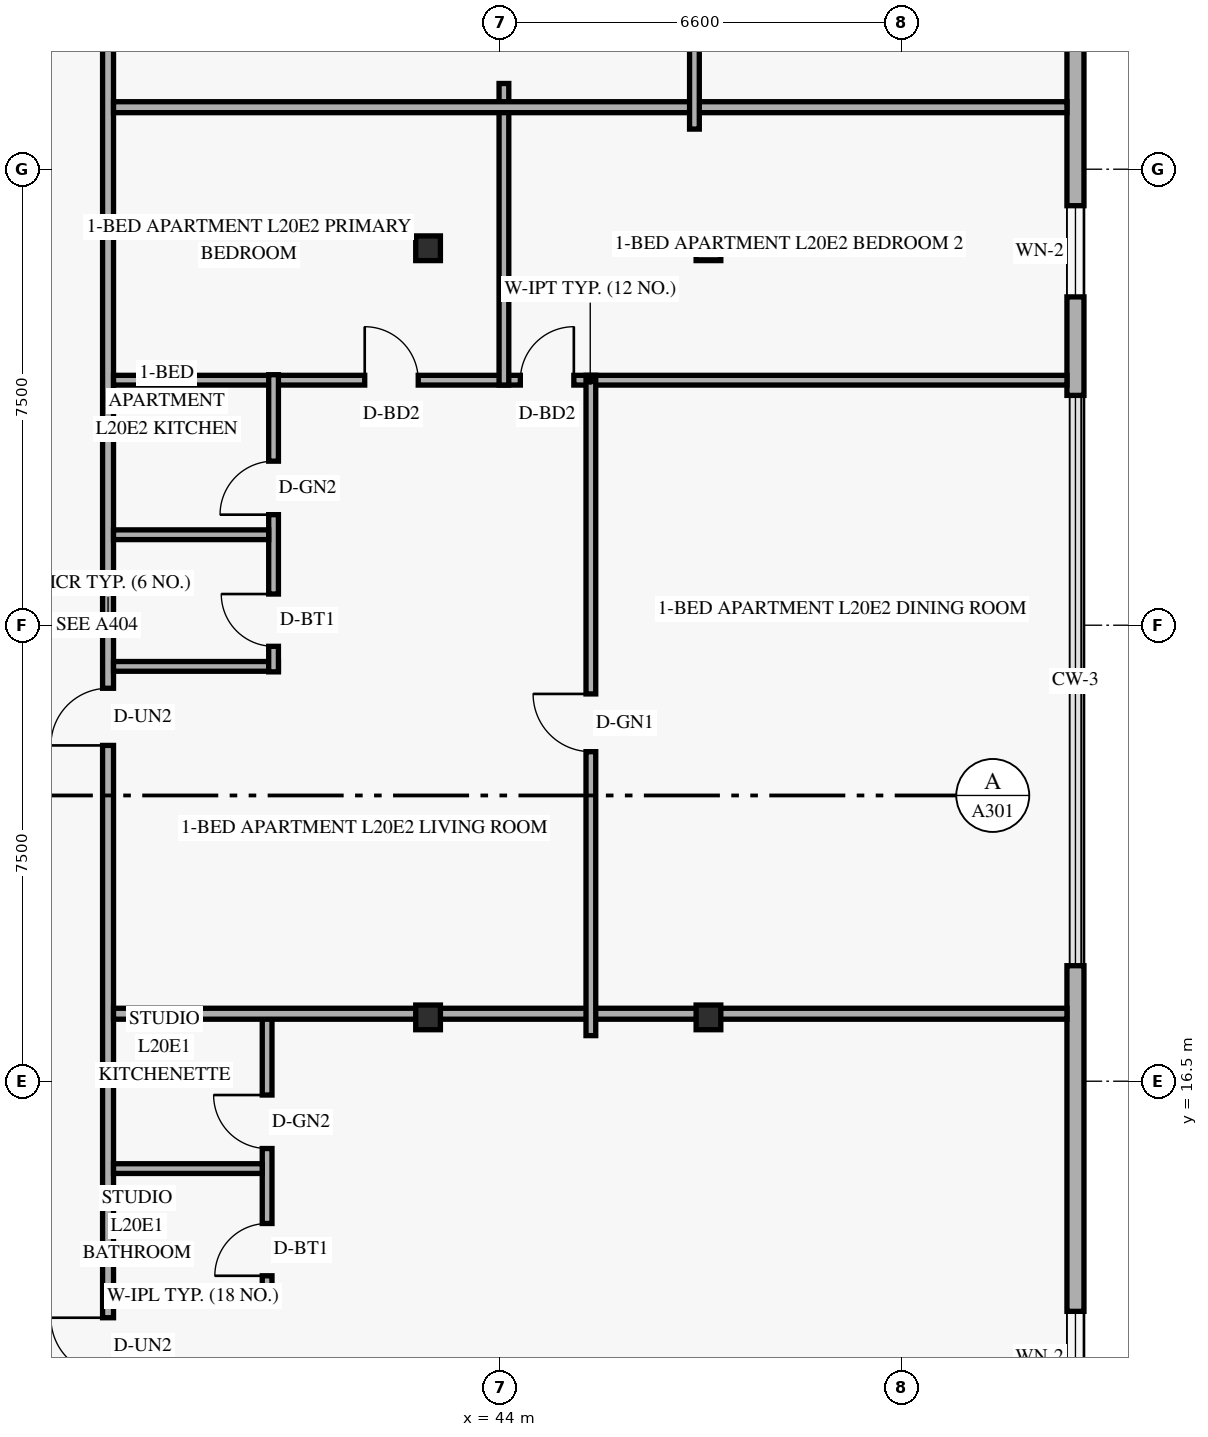
"""IFC4 building model, lengths in metres.
Left out: names, types, materials, properties, quantities, classifications, styles, units other than length and angle.
Written with IfcOpenShell. Run it as: python <this file> out.ifc"""

import sys

from ifc_helpers import new_model, si_unit, direction, frame, frame_2d, origin, origin_2d, place, context, subcontext, project, spatial, rectangle, hollow_rectangle, extrude, element, fill, save


model = new_model("IFC4")
c1 = context("Model", 3, precision=1e-05, world=origin(), true_north=direction((0.0, 1.0)))
c2 = subcontext(c1, "Body", "Model", "MODEL_VIEW")
j1 = project(units=[si_unit("LENGTHUNIT", "METRE"), si_unit("PLANEANGLEUNIT", "RADIAN")], contexts=[c1])
p1 = place(None, origin())
s1 = spatial("IfcSite", under=j1, at=p1, CompositionType="ELEMENT")
p2 = place(p1, origin())
s2 = spatial("IfcBuilding", under=s1, at=p2, CompositionType="ELEMENT")
p3 = place(p2, frame((0.0, 0.0, 80.4)))
s3 = spatial("IfcBuildingStorey", under=s2, at=p3, CompositionType="ELEMENT", Elevation=80.4)
for number, where, z_axis, x_axis in (
    (1, (42.75, 17.55, 0.0), (0.035, 0.0, 0.999), (0.0, 1.0, 0.0)),
    (2, (42.75, 30.2, 0.0), (0.035, 0.0, 0.999), (0.0, 1.0, 0.0)),
):
    element("IfcColumn", number, at=place(p3, frame(where, z_axis=z_axis, x_axis=x_axis)), inside=s3, PredefinedType="COLUMN", context=c2, shape_type="SweptSolid", body=[
        extrude(hollow_rectangle(XDim=0.406, YDim=0.406, WallThickness=0.016, at=origin_2d()), origin(), (0.0, 0.0, 1.0), 3.602),
    ])
for number, where, z_axis, x_axis in (
    (3, (47.32, 17.55, 0.0), (0.058, 0.0, 0.998), (0.0, 1.0, 0.0)),
    (4, (47.32, 30.2, 0.0), (0.058, 0.0, 0.998), (0.0, 1.0, 0.0)),
):
    element("IfcColumn", number, at=place(p3, frame(where, z_axis=z_axis, x_axis=x_axis)), inside=s3, PredefinedType="COLUMN", context=c2, shape_type="SweptSolid", body=[
        extrude(hollow_rectangle(XDim=0.406, YDim=0.406, WallThickness=0.016, at=origin_2d()), origin(), (0.0, 0.0, 1.0), 3.606),
    ])
p4 = place(p3, frame((53.46, 6.32, 0.0), z_axis=(0.0, 0.0, 1.0), x_axis=(0.0, 1.0, 0.0)))
e5 = element("IfcWall", 5, at=p4, inside=s3, PredefinedType="SOLIDWALL", context=c2, shape_type="SweptSolid", body=[
    extrude(rectangle(XDim=12.08, YDim=0.28, at=frame_2d((6.04, 0.0))), origin(), (0.0, 0.0, 1.0), 3.36),
])
p5 = place(p4, frame((4.895, 0.0, 0.85)))
e6 = element("IfcOpeningElement", 6, at=p5, cuts=e5, PredefinedType="OPENING", context=c2, shape_type="SweptSolid", body=[
    extrude(rectangle(XDim=1.5, YDim=1.55, at=frame_2d((0.75, 0.775))), frame((0.0, 0.15, 0.0), z_axis=(0.0, -1.0, 0.0), x_axis=(1.0, 0.0, 0.0)), (0.0, 0.0, 1.0), 0.3),
])
p6 = place(p3, frame((53.46, 27.78, 0.0), z_axis=(0.0, 0.0, 1.0), x_axis=(0.0, 1.0, 0.0)))
e7 = element("IfcWall", 7, at=p6, inside=s3, PredefinedType="SOLIDWALL", context=c2, shape_type="SweptSolid", body=[
    extrude(rectangle(XDim=13.9, YDim=0.28, at=frame_2d((6.95, 0.0))), origin(), (0.0, 0.0, 1.0), 3.36),
])
p7 = place(p6, frame((1.62, 0.0, 0.85)))
e8 = element("IfcOpeningElement", 8, at=p7, cuts=e7, PredefinedType="OPENING", context=c2, shape_type="SweptSolid", body=[
    extrude(rectangle(XDim=1.5, YDim=1.55, at=frame_2d((0.75, 0.775))), frame((0.0, 0.15, 0.0), z_axis=(0.0, -1.0, 0.0), x_axis=(1.0, 0.0, 0.0)), (0.0, 0.0, 1.0), 0.3),
])
p8 = place(p6, frame((8.31, 0.0, 0.85)))
e9 = element("IfcOpeningElement", 9, at=p8, cuts=e7, PredefinedType="OPENING", context=c2, shape_type="SweptSolid", body=[
    extrude(rectangle(XDim=1.5, YDim=1.55, at=frame_2d((0.75, 0.775))), frame((0.0, 0.15, 0.0), z_axis=(0.0, -1.0, 0.0), x_axis=(1.0, 0.0, 0.0)), (0.0, 0.0, 1.0), 0.3),
])
p9 = place(p3, frame((37.55, 2.98, 0.0), z_axis=(0.0, 0.0, 1.0), x_axis=(0.0, 1.0, 0.0)))
e10 = element("IfcWall", 10, at=p9, inside=s3, PredefinedType="STANDARD", context=c2, shape_type="SweptSolid", body=[
    extrude(rectangle(XDim=42.04, YDim=0.18, at=frame_2d((21.02, 0.0))), origin(), (0.0, 0.0, 1.0), 2.731),
])
p10 = place(p9, frame((8.69, 0.0, 0.0)))
e11 = element("IfcOpeningElement", 11, at=p10, cuts=e10, PredefinedType="OPENING", context=c2, shape_type="SweptSolid", body=[
    extrude(rectangle(XDim=0.94, YDim=2.15, at=frame_2d((0.47, 1.075))), frame((0.0, 0.1, 0.0), z_axis=(0.0, -1.0, 0.0), x_axis=(1.0, 0.0, 0.0)), (0.0, 0.0, 1.0), 0.2),
])
p11 = place(p9, frame((19.043, 0.0, 0.0)))
e12 = element("IfcOpeningElement", 12, at=p11, cuts=e10, PredefinedType="OPENING", context=c2, shape_type="SweptSolid", body=[
    extrude(rectangle(XDim=0.94, YDim=2.15, at=frame_2d((0.47, 1.075))), frame((0.0, 0.1, 0.0), z_axis=(0.0, -1.0, 0.0), x_axis=(1.0, 0.0, 0.0)), (0.0, 0.0, 1.0), 0.2),
])
p12 = place(p9, frame((32.145, 0.0, 0.0)))
e13 = element("IfcOpeningElement", 13, at=p12, cuts=e10, PredefinedType="OPENING", context=c2, shape_type="SweptSolid", body=[
    extrude(rectangle(XDim=0.94, YDim=2.15, at=frame_2d((0.47, 1.075))), frame((0.0, 0.1, 0.0), z_axis=(0.0, -1.0, 0.0), x_axis=(1.0, 0.0, 0.0)), (0.0, 0.0, 1.0), 0.2),
])
p13 = place(p3, frame((37.64, 12.97, 0.0), z_axis=(0.0, 0.0, 1.0), x_axis=(1.0, 0.0, 0.0)))
e14 = element("IfcWall", 14, at=p13, inside=s3, PredefinedType="PLUMBINGWALL", context=c2, shape_type="SweptSolid", body=[
    extrude(rectangle(XDim=2.606, YDim=0.16, at=frame_2d((1.303, 0.0))), origin(), (0.0, 0.0, 1.0), 3.36),
])
p14 = place(p3, frame((40.166, 12.88, 0.0), z_axis=(0.0, 0.0, 1.0), x_axis=(0.0, 1.0, 0.0)))
e15 = element("IfcWall", 15, at=p14, inside=s3, PredefinedType="PLUMBINGWALL", context=c2, shape_type="SweptSolid", body=[
    extrude(rectangle(XDim=4.73, YDim=0.16, at=frame_2d((2.365, 0.0))), origin(), (0.0, 0.0, 1.0), 2.731),
])
p15 = place(p14, frame((0.42, 0.0, 0.0)))
e16 = element("IfcOpeningElement", 16, at=p15, cuts=e15, PredefinedType="OPENING", context=c2, shape_type="SweptSolid", body=[
    extrude(rectangle(XDim=0.86, YDim=2.12, at=frame_2d((0.43, 1.06))), frame((0.0, 0.09, 0.0), z_axis=(0.0, -1.0, 0.0), x_axis=(1.0, 0.0, 0.0)), (0.0, 0.0, 1.0), 0.18),
])
p16 = place(p14, frame((2.513, 0.0, 0.0)))
e17 = element("IfcOpeningElement", 17, at=p16, cuts=e15, PredefinedType="OPENING", context=c2, shape_type="SweptSolid", body=[
    extrude(rectangle(XDim=0.88, YDim=2.12, at=frame_2d((0.44, 1.06))), frame((0.0, 0.09, 0.0), z_axis=(0.0, -1.0, 0.0), x_axis=(1.0, 0.0, 0.0)), (0.0, 0.0, 1.0), 0.18),
])
p17 = place(p3, frame((37.64, 15.063, 0.0), z_axis=(0.0, 0.0, 1.0), x_axis=(1.0, 0.0, 0.0)))
e18 = element("IfcWall", 18, at=p17, inside=s3, PredefinedType="PLUMBINGWALL", context=c2, shape_type="SweptSolid", body=[
    extrude(rectangle(XDim=2.446, YDim=0.16, at=frame_2d((1.223, 0.0))), origin(), (0.0, 0.0, 1.0), 3.36),
])
p18 = place(p3, frame((37.64, 17.61, 0.0), z_axis=(0.0, 0.0, 1.0), x_axis=(1.0, 0.0, 0.0)))
e19 = element("IfcWall", 19, at=p18, inside=s3, PredefinedType="PARTITIONING", context=c2, shape_type="SweptSolid", body=[
    extrude(rectangle(XDim=15.68, YDim=0.18, at=frame_2d((7.84, 0.0))), origin(), (0.0, 0.0, 1.0), 2.731),
])
p19 = place(p3, frame((37.64, 28.03, 0.0), z_axis=(0.0, 0.0, 1.0), x_axis=(1.0, 0.0, 0.0)))
e20 = element("IfcWall", 20, at=p19, inside=s3, PredefinedType="PARTITIONING", context=c2, shape_type="SweptSolid", body=[
    extrude(rectangle(XDim=15.68, YDim=0.16, at=frame_2d((7.84, 0.0))), origin(), (0.0, 0.0, 1.0), 2.731),
])
p20 = place(p19, frame((4.131, 0.0, 0.0)))
e21 = element("IfcOpeningElement", 21, at=p20, cuts=e20, PredefinedType="OPENING", context=c2, shape_type="SweptSolid", body=[
    extrude(rectangle(XDim=0.88, YDim=2.14, at=frame_2d((0.44, 1.07))), frame((0.0, 0.09, 0.0), z_axis=(0.0, -1.0, 0.0), x_axis=(1.0, 0.0, 0.0)), (0.0, 0.0, 1.0), 0.18),
])
p21 = place(p19, frame((6.69, 0.0, 0.0)))
e22 = element("IfcOpeningElement", 22, at=p21, cuts=e20, PredefinedType="OPENING", context=c2, shape_type="SweptSolid", body=[
    extrude(rectangle(XDim=0.88, YDim=2.14, at=frame_2d((0.44, 1.07))), frame((0.0, 0.09, 0.0), z_axis=(0.0, -1.0, 0.0), x_axis=(1.0, 0.0, 0.0)), (0.0, 0.0, 1.0), 0.18),
])
p22 = place(p3, frame((37.64, 23.323, 0.0), z_axis=(0.0, 0.0, 1.0), x_axis=(1.0, 0.0, 0.0)))
e23 = element("IfcWall", 23, at=p22, inside=s3, PredefinedType="PLUMBINGWALL", context=c2, shape_type="SweptSolid", body=[
    extrude(rectangle(XDim=2.712, YDim=0.16, at=frame_2d((1.356, 0.0))), origin(), (0.0, 0.0, 1.0), 3.36),
])
p23 = place(p3, frame((40.272, 23.233, 0.0), z_axis=(0.0, 0.0, 1.0), x_axis=(0.0, 1.0, 0.0)))
e24 = element("IfcWall", 24, at=p23, inside=s3, PredefinedType="PLUMBINGWALL", context=c2, shape_type="SweptSolid", body=[
    extrude(rectangle(XDim=4.887, YDim=0.16, at=frame_2d((2.444, 0.0))), origin(), (0.0, 0.0, 1.0), 3.36),
])
p24 = place(p23, frame((0.42, 0.0, 0.0)))
e25 = element("IfcOpeningElement", 25, at=p24, cuts=e24, PredefinedType="OPENING", context=c2, shape_type="SweptSolid", body=[
    extrude(rectangle(XDim=0.86, YDim=2.12, at=frame_2d((0.43, 1.06))), frame((0.0, 0.09, 0.0), z_axis=(0.0, -1.0, 0.0), x_axis=(1.0, 0.0, 0.0)), (0.0, 0.0, 1.0), 0.18),
])
p25 = place(p23, frame((2.585, 0.0, 0.0)))
e26 = element("IfcOpeningElement", 26, at=p25, cuts=e24, PredefinedType="OPENING", context=c2, shape_type="SweptSolid", body=[
    extrude(rectangle(XDim=0.88, YDim=2.12, at=frame_2d((0.44, 1.06))), frame((0.0, 0.09, 0.0), z_axis=(0.0, -1.0, 0.0), x_axis=(1.0, 0.0, 0.0)), (0.0, 0.0, 1.0), 0.18),
])
p26 = place(p3, frame((37.64, 25.488, 0.0), z_axis=(0.0, 0.0, 1.0), x_axis=(1.0, 0.0, 0.0)))
e27 = element("IfcWall", 27, at=p26, inside=s3, PredefinedType="PLUMBINGWALL", context=c2, shape_type="SweptSolid", body=[
    extrude(rectangle(XDim=2.552, YDim=0.16, at=frame_2d((1.276, 0.0))), origin(), (0.0, 0.0, 1.0), 3.36),
])
p27 = place(p3, frame((45.49, 17.25, 0.0), z_axis=(0.0, 0.0, 1.0), x_axis=(0.0, 1.0, 0.0)))
e28 = element("IfcWall", 28, at=p27, inside=s3, PredefinedType="PARTITIONING", context=c2, shape_type="SweptSolid", body=[
    extrude(rectangle(XDim=10.86, YDim=0.16, at=frame_2d((5.43, 0.0))), origin(), (0.0, 0.0, 1.0), 2.731),
])
p28 = place(p27, frame((4.67, 0.0, 0.0)))
e29 = element("IfcOpeningElement", 29, at=p28, cuts=e28, PredefinedType="OPENING", context=c2, shape_type="SweptSolid", body=[
    extrude(rectangle(XDim=0.95, YDim=2.15, at=frame_2d((0.475, 1.075))), frame((0.0, 0.09, 0.0), z_axis=(0.0, -1.0, 0.0), x_axis=(1.0, 0.0, 0.0)), (0.0, 0.0, 1.0), 0.18),
])
p29 = place(p3, frame((44.061, 27.95, 0.0), z_axis=(0.0, 0.0, 1.0), x_axis=(0.0, 1.0, 0.0)))
e30 = element("IfcWall", 30, at=p29, inside=s3, PredefinedType="PARTITIONING", context=c2, shape_type="SweptSolid", body=[
    extrude(rectangle(XDim=4.96, YDim=0.16, at=frame_2d((2.48, 0.0))), origin(), (0.0, 0.0, 1.0), 2.731),
])
p30 = place(p3, frame((37.64, 32.52, 0.0), z_axis=(0.0, 0.0, 1.0), x_axis=(1.0, 0.0, 0.0)))
e31 = element("IfcWall", 31, at=p30, inside=s3, PredefinedType="PARTITIONING", context=c2, shape_type="SweptSolid", body=[
    extrude(rectangle(XDim=15.68, YDim=0.18, at=frame_2d((7.84, 0.0))), origin(), (0.0, 0.0, 1.0), 2.731),
])
p31 = place(p3, frame((47.194, 32.16, 0.0), z_axis=(0.0, 0.0, 1.0), x_axis=(0.0, 1.0, 0.0)))
e32 = element("IfcWall", 32, at=p31, inside=s3, PredefinedType="PARTITIONING", context=c2, shape_type="SweptSolid", body=[
    extrude(rectangle(XDim=9.08, YDim=0.16, at=frame_2d((4.54, 0.0))), origin(), (0.0, 0.0, 1.0), 2.731),
])
p32 = place(p31, frame((3.78, 0.0, 0.0)))
e33 = element("IfcOpeningElement", 33, at=p32, cuts=e32, PredefinedType="OPENING", context=c2, shape_type="SweptSolid", body=[
    extrude(rectangle(XDim=0.95, YDim=2.15, at=frame_2d((0.475, 1.075))), frame((0.0, 0.09, 0.0), z_axis=(0.0, -1.0, 0.0), x_axis=(1.0, 0.0, 0.0)), (0.0, 0.0, 1.0), 0.18),
])
p33 = place(p5, origin())
e34 = element("IfcWindow", 34, at=p33, inside=s3, PartitioningType="SINGLE_PANEL", PredefinedType="WINDOW", context=c2, shape_type="SweptSolid", body=[
    extrude(rectangle(XDim=1.5, YDim=1.55, at=frame_2d((0.75, 0.775))), frame((0.0, 0.03, 0.0), z_axis=(0.0, -1.0, 0.0), x_axis=(1.0, 0.0, 0.0)), (0.0, 0.0, 1.0), 0.06),
])
fill(e6, e34)
p34 = place(p7, origin())
e35 = element("IfcWindow", 35, at=p34, inside=s3, PartitioningType="SINGLE_PANEL", PredefinedType="WINDOW", context=c2, shape_type="SweptSolid", body=[
    extrude(rectangle(XDim=1.5, YDim=1.55, at=frame_2d((0.75, 0.775))), frame((0.0, 0.03, 0.0), z_axis=(0.0, -1.0, 0.0), x_axis=(1.0, 0.0, 0.0)), (0.0, 0.0, 1.0), 0.06),
])
fill(e8, e35)
p35 = place(p10, origin())
e36 = element("IfcDoor", 36, at=p35, inside=s3, OperationType="SINGLE_SWING_RIGHT", PredefinedType="DOOR", context=c2, shape_type="SweptSolid", body=[
    extrude(rectangle(XDim=0.94, YDim=2.15, at=frame_2d((0.47, 1.075))), frame((0.0, 0.025, 0.0), z_axis=(0.0, -1.0, 0.0), x_axis=(1.0, 0.0, 0.0)), (0.0, 0.0, 1.0), 0.05),
])
fill(e11, e36)
p36 = place(p15, origin())
e37 = element("IfcDoor", 37, at=p36, inside=s3, OperationType="SINGLE_SWING_LEFT", PredefinedType="DOOR", context=c2, shape_type="SweptSolid", body=[
    extrude(rectangle(XDim=0.86, YDim=2.12, at=frame_2d((0.43, 1.06))), frame((0.0, 0.025, 0.0), z_axis=(0.0, -1.0, 0.0), x_axis=(1.0, 0.0, 0.0)), (0.0, 0.0, 1.0), 0.05),
])
fill(e16, e37)
p37 = place(p16, origin())
e38 = element("IfcDoor", 38, at=p37, inside=s3, OperationType="SINGLE_SWING_RIGHT", PredefinedType="DOOR", context=c2, shape_type="SweptSolid", body=[
    extrude(rectangle(XDim=0.88, YDim=2.12, at=frame_2d((0.44, 1.06))), frame((0.0, 0.025, 0.0), z_axis=(0.0, -1.0, 0.0), x_axis=(1.0, 0.0, 0.0)), (0.0, 0.0, 1.0), 0.05),
])
fill(e17, e38)
p38 = place(p28, origin())
e39 = element("IfcDoor", 39, at=p38, inside=s3, OperationType="SINGLE_SWING_RIGHT", PredefinedType="DOOR", context=c2, shape_type="SweptSolid", body=[
    extrude(rectangle(XDim=0.95, YDim=2.15, at=frame_2d((0.475, 1.075))), frame((0.0, 0.025, 0.0), z_axis=(0.0, -1.0, 0.0), x_axis=(1.0, 0.0, 0.0)), (0.0, 0.0, 1.0), 0.05),
])
fill(e29, e39)
p39 = place(p11, origin())
e40 = element("IfcDoor", 40, at=p39, inside=s3, OperationType="SINGLE_SWING_LEFT", PredefinedType="DOOR", context=c2, shape_type="SweptSolid", body=[
    extrude(rectangle(XDim=0.94, YDim=2.15, at=frame_2d((0.47, 1.075))), frame((0.0, 0.025, 0.0), z_axis=(0.0, -1.0, 0.0), x_axis=(1.0, 0.0, 0.0)), (0.0, 0.0, 1.0), 0.05),
])
fill(e12, e40)
p40 = place(p24, origin())
e41 = element("IfcDoor", 41, at=p40, inside=s3, OperationType="SINGLE_SWING_RIGHT", PredefinedType="DOOR", context=c2, shape_type="SweptSolid", body=[
    extrude(rectangle(XDim=0.86, YDim=2.12, at=frame_2d((0.43, 1.06))), frame((0.0, 0.025, 0.0), z_axis=(0.0, -1.0, 0.0), x_axis=(1.0, 0.0, 0.0)), (0.0, 0.0, 1.0), 0.05),
])
fill(e25, e41)
p41 = place(p25, origin())
e42 = element("IfcDoor", 42, at=p41, inside=s3, OperationType="SINGLE_SWING_LEFT", PredefinedType="DOOR", context=c2, shape_type="SweptSolid", body=[
    extrude(rectangle(XDim=0.88, YDim=2.12, at=frame_2d((0.44, 1.06))), frame((0.0, 0.025, 0.0), z_axis=(0.0, -1.0, 0.0), x_axis=(1.0, 0.0, 0.0)), (0.0, 0.0, 1.0), 0.05),
])
fill(e26, e42)
p42 = place(p20, origin())
e43 = element("IfcDoor", 43, at=p42, inside=s3, OperationType="SINGLE_SWING_LEFT", PredefinedType="DOOR", context=c2, shape_type="SweptSolid", body=[
    extrude(rectangle(XDim=0.88, YDim=2.14, at=frame_2d((0.44, 1.07))), frame((0.0, 0.025, 0.0), z_axis=(0.0, -1.0, 0.0), x_axis=(1.0, 0.0, 0.0)), (0.0, 0.0, 1.0), 0.05),
])
fill(e21, e43)
p43 = place(p21, origin())
e44 = element("IfcDoor", 44, at=p43, inside=s3, OperationType="SINGLE_SWING_RIGHT", PredefinedType="DOOR", context=c2, shape_type="SweptSolid", body=[
    extrude(rectangle(XDim=0.88, YDim=2.14, at=frame_2d((0.44, 1.07))), frame((0.0, 0.025, 0.0), z_axis=(0.0, -1.0, 0.0), x_axis=(1.0, 0.0, 0.0)), (0.0, 0.0, 1.0), 0.05),
])
fill(e22, e44)
save(model, sys.argv[1])
